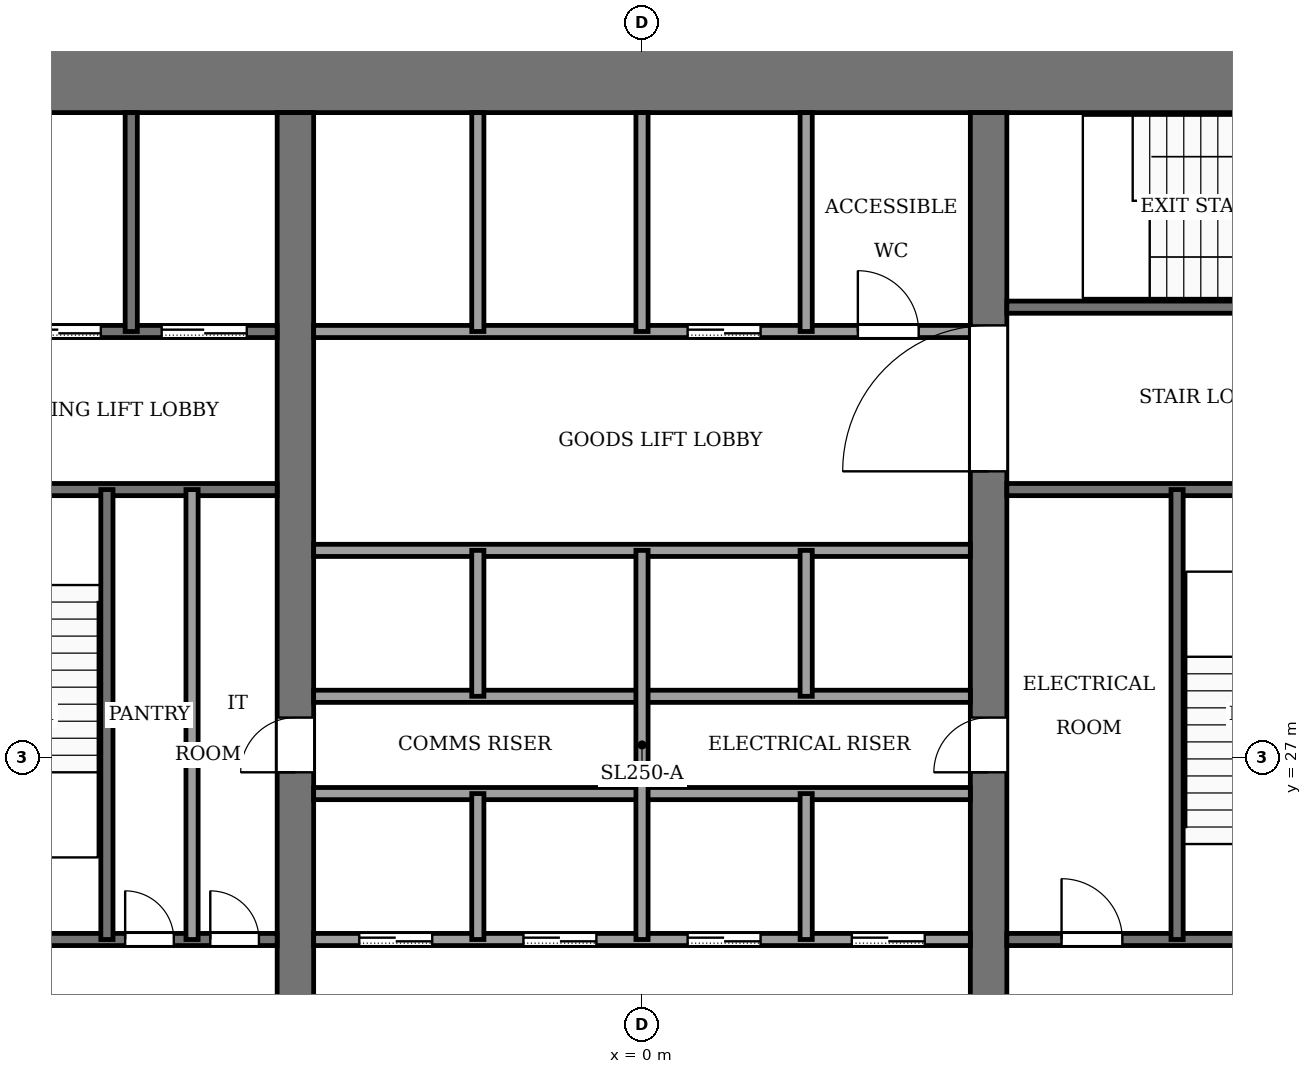
"""IFC4 building model, lengths in metres.
Left out: names, types, materials, properties, quantities, classifications, styles, units other than length and angle.
Written with IfcOpenShell. Run it as: python <this file> out.ifc"""

import sys

from ifc_helpers import new_model, si_unit, direction, frame, frame_2d, origin, place, context, subcontext, project, spatial, rectangle, extrude, element, fill, save


model = new_model("IFC4")
c1 = context("Model", 3, precision=1e-05, world=origin(), true_north=direction((0.0, 1.0)))
c2 = subcontext(c1, "Body", "Model", "MODEL_VIEW")
j1 = project(units=[si_unit("LENGTHUNIT", "METRE"), si_unit("PLANEANGLEUNIT", "RADIAN")], contexts=[c1])
p1 = place(None, origin())
s1 = spatial("IfcSite", under=j1, at=p1, CompositionType="ELEMENT")
p2 = place(p1, origin())
s2 = spatial("IfcBuilding", under=s1, at=p2, CompositionType="ELEMENT")
p3 = place(p2, frame((0.0, 0.0, 94.0)))
s3 = spatial("IfcBuildingStorey", under=s2, at=p3, CompositionType="ELEMENT", Elevation=94.0)
p4 = place(p3, frame((-13.8, 38.2, -0.13), z_axis=(0.0, 0.0, 1.0), x_axis=(1.0, 0.0, 0.0)))
e1 = element("IfcWall", 1, at=p4, inside=s3, PredefinedType="SHEAR", context=c2, shape_type="SweptSolid", body=[
    extrude(rectangle(XDim=27.6, YDim=1.2, at=frame_2d((13.8, 0.0))), origin(), (0.0, 0.0, 1.0), 4.0),
])
p5 = place(p3, frame((-5.7, 18.4, -0.13), z_axis=(0.0, 0.0, 1.0), x_axis=(0.0, 1.0, 0.0)))
e2 = element("IfcWall", 2, at=p5, inside=s3, PredefinedType="SHEAR", context=c2, shape_type="SweptSolid", body=[
    extrude(rectangle(XDim=19.2, YDim=0.6, at=frame_2d((9.6, 0.0))), origin(), (0.0, 0.0, 1.0), 4.0),
])
p6 = place(p5, frame((8.35, 0.0, 0.13)))
e3 = element("IfcOpeningElement", 3, at=p6, cuts=e2, PredefinedType="OPENING", context=c2, shape_type="SweptSolid", body=[
    extrude(rectangle(XDim=0.9, YDim=2.1, at=frame_2d((0.45, 1.05))), frame((0.0, 0.31, 0.0), z_axis=(0.0, -1.0, 0.0), x_axis=(1.0, 0.0, 0.0)), (0.0, 0.0, 1.0), 0.62),
])
p7 = place(p3, frame((5.7, 18.4, -0.13), z_axis=(0.0, 0.0, 1.0), x_axis=(0.0, 1.0, 0.0)))
e4 = element("IfcWall", 4, at=p7, inside=s3, PredefinedType="SHEAR", context=c2, shape_type="SweptSolid", body=[
    extrude(rectangle(XDim=19.2, YDim=0.6, at=frame_2d((9.6, 0.0))), origin(), (0.0, 0.0, 1.0), 4.0),
])
p8 = place(p7, frame((8.35, 0.0, 0.13)))
e5 = element("IfcOpeningElement", 5, at=p8, cuts=e4, PredefinedType="OPENING", context=c2, shape_type="SweptSolid", body=[
    extrude(rectangle(XDim=0.9, YDim=2.1, at=frame_2d((0.45, 1.05))), frame((0.0, 0.31, 0.0), z_axis=(0.0, -1.0, 0.0), x_axis=(1.0, 0.0, 0.0)), (0.0, 0.0, 1.0), 0.62),
])
p9 = place(p7, frame((13.3, 0.0, 0.13)))
e6 = element("IfcOpeningElement", 6, at=p9, cuts=e4, PredefinedType="OPENING", context=c2, shape_type="SweptSolid", body=[
    extrude(rectangle(XDim=2.4, YDim=2.4, at=frame_2d((1.2, 1.2))), frame((0.0, 0.31, 0.0), z_axis=(0.0, -1.0, 0.0), x_axis=(1.0, 0.0, 0.0)), (0.0, 0.0, 1.0), 0.62),
])
p10 = place(p3, frame((-12.6, 24.0, 0.0), z_axis=(0.0, 0.0, 1.0), x_axis=(1.0, 0.0, 0.0)))
e7 = element("IfcWall", 7, at=p10, inside=s3, PredefinedType="PARTITIONING", context=c2, shape_type="SweptSolid", body=[
    extrude(rectangle(XDim=6.6, YDim=0.2, at=frame_2d((3.3, 0.0))), origin(), (0.0, 0.0, 1.0), 3.87),
])
p11 = place(p10, frame((4.1, 0.0, 0.0)))
e8 = element("IfcOpeningElement", 8, at=p11, cuts=e7, PredefinedType="OPENING", context=c2, shape_type="SweptSolid", body=[
    extrude(rectangle(XDim=0.8, YDim=2.1, at=frame_2d((0.4, 1.05))), frame((0.0, 0.11, 0.0), z_axis=(0.0, -1.0, 0.0), x_axis=(1.0, 0.0, 0.0)), (0.0, 0.0, 1.0), 0.22),
])
p12 = place(p10, frame((5.5, 0.0, 0.0)))
e9 = element("IfcOpeningElement", 9, at=p12, cuts=e7, PredefinedType="OPENING", context=c2, shape_type="SweptSolid", body=[
    extrude(rectangle(XDim=0.8, YDim=2.1, at=frame_2d((0.4, 1.05))), frame((0.0, 0.11, 0.0), z_axis=(0.0, -1.0, 0.0), x_axis=(1.0, 0.0, 0.0)), (0.0, 0.0, 1.0), 0.22),
])
p13 = place(p3, frame((-5.4, 24.0, 0.0), z_axis=(0.0, 0.0, 1.0), x_axis=(1.0, 0.0, 0.0)))
e10 = element("IfcWall", 10, at=p13, inside=s3, PredefinedType="PARTITIONING", context=c2, shape_type="SweptSolid", body=[
    extrude(rectangle(XDim=10.8, YDim=0.2, at=frame_2d((5.4, 0.0))), origin(), (0.0, 0.0, 1.0), 3.87),
])
p14 = place(p13, frame((0.75, 0.0, 0.0)))
e11 = element("IfcOpeningElement", 11, at=p14, cuts=e10, PredefinedType="OPENING", context=c2, shape_type="SweptSolid", body=[
    extrude(rectangle(XDim=1.2, YDim=2.2, at=frame_2d((0.6, 1.1))), frame((0.0, 0.11, 0.0), z_axis=(0.0, -1.0, 0.0), x_axis=(1.0, 0.0, 0.0)), (0.0, 0.0, 1.0), 0.22),
])
p15 = place(p13, frame((3.45, 0.0, 0.0)))
e12 = element("IfcOpeningElement", 12, at=p15, cuts=e10, PredefinedType="OPENING", context=c2, shape_type="SweptSolid", body=[
    extrude(rectangle(XDim=1.2, YDim=2.2, at=frame_2d((0.6, 1.1))), frame((0.0, 0.11, 0.0), z_axis=(0.0, -1.0, 0.0), x_axis=(1.0, 0.0, 0.0)), (0.0, 0.0, 1.0), 0.22),
])
p16 = place(p13, frame((6.15, 0.0, 0.0)))
e13 = element("IfcOpeningElement", 13, at=p16, cuts=e10, PredefinedType="OPENING", context=c2, shape_type="SweptSolid", body=[
    extrude(rectangle(XDim=1.2, YDim=2.2, at=frame_2d((0.6, 1.1))), frame((0.0, 0.11, 0.0), z_axis=(0.0, -1.0, 0.0), x_axis=(1.0, 0.0, 0.0)), (0.0, 0.0, 1.0), 0.22),
])
p17 = place(p13, frame((8.85, 0.0, 0.0)))
e14 = element("IfcOpeningElement", 14, at=p17, cuts=e10, PredefinedType="OPENING", context=c2, shape_type="SweptSolid", body=[
    extrude(rectangle(XDim=1.2, YDim=2.2, at=frame_2d((0.6, 1.1))), frame((0.0, 0.11, 0.0), z_axis=(0.0, -1.0, 0.0), x_axis=(1.0, 0.0, 0.0)), (0.0, 0.0, 1.0), 0.22),
])
p18 = place(p3, frame((6.0, 24.0, 0.0), z_axis=(0.0, 0.0, 1.0), x_axis=(1.0, 0.0, 0.0)))
e15 = element("IfcWall", 15, at=p18, inside=s3, PredefinedType="PARTITIONING", context=c2, shape_type="SweptSolid", body=[
    extrude(rectangle(XDim=6.6, YDim=0.2, at=frame_2d((3.3, 0.0))), origin(), (0.0, 0.0, 1.0), 3.87),
])
p19 = place(p18, frame((0.9, 0.0, 0.0)))
e16 = element("IfcOpeningElement", 16, at=p19, cuts=e15, PredefinedType="OPENING", context=c2, shape_type="SweptSolid", body=[
    extrude(rectangle(XDim=1.0, YDim=2.1, at=frame_2d((0.5, 1.05))), frame((0.0, 0.11, 0.0), z_axis=(0.0, -1.0, 0.0), x_axis=(1.0, 0.0, 0.0)), (0.0, 0.0, 1.0), 0.22),
])
p20 = place(p18, frame((4.4, 0.0, 0.0)))
e17 = element("IfcOpeningElement", 17, at=p20, cuts=e15, PredefinedType="OPENING", context=c2, shape_type="SweptSolid", body=[
    extrude(rectangle(XDim=1.2, YDim=2.2, at=frame_2d((0.6, 1.1))), frame((0.0, 0.11, 0.0), z_axis=(0.0, -1.0, 0.0), x_axis=(1.0, 0.0, 0.0)), (0.0, 0.0, 1.0), 0.22),
])
for number, where, z_axis, x_axis in (
    (18, (-5.4, 26.4, 0.0), (0.0, 0.0, 1.0), (1.0, 0.0, 0.0)),
    (19, (-5.4, 28.0, 0.0), (0.0, 0.0, 1.0), (1.0, 0.0, 0.0)),
    (20, (-5.4, 30.4, 0.0), (0.0, 0.0, 1.0), (1.0, 0.0, 0.0)),
):
    element("IfcWall", number, at=place(p3, frame(where, z_axis=z_axis, x_axis=x_axis)), inside=s3, PredefinedType="PARTITIONING", context=c2, shape_type="SweptSolid", body=[
        extrude(rectangle(XDim=10.8, YDim=0.2, at=frame_2d((5.4, 0.0))), origin(), (0.0, 0.0, 1.0), 3.87),
    ])
p21 = place(p3, frame((-12.6, 31.4, 0.0), z_axis=(0.0, 0.0, 1.0), x_axis=(1.0, 0.0, 0.0)))
e21 = element("IfcWall", 21, at=p21, inside=s3, PredefinedType="PARTITIONING", context=c2, shape_type="SweptSolid", body=[
    extrude(rectangle(XDim=6.6, YDim=0.2, at=frame_2d((3.3, 0.0))), origin(), (0.0, 0.0, 1.0), 3.87),
])
p22 = place(p21, frame((1.0, 0.0, 0.0)))
e22 = element("IfcOpeningElement", 22, at=p22, cuts=e21, PredefinedType="OPENING", context=c2, shape_type="SweptSolid", body=[
    extrude(rectangle(XDim=1.2, YDim=2.2, at=frame_2d((0.6, 1.1))), frame((0.0, 0.11, 0.0), z_axis=(0.0, -1.0, 0.0), x_axis=(1.0, 0.0, 0.0)), (0.0, 0.0, 1.0), 0.22),
])
p23 = place(p3, frame((6.0, 31.4, 0.0), z_axis=(0.0, 0.0, 1.0), x_axis=(1.0, 0.0, 0.0)))
e23 = element("IfcWall", 23, at=p23, inside=s3, PredefinedType="PARTITIONING", context=c2, shape_type="SweptSolid", body=[
    extrude(rectangle(XDim=6.6, YDim=0.2, at=frame_2d((3.3, 0.0))), origin(), (0.0, 0.0, 1.0), 3.87),
])
p24 = place(p3, frame((-12.6, 34.0, 0.0), z_axis=(0.0, 0.0, 1.0), x_axis=(1.0, 0.0, 0.0)))
e24 = element("IfcWall", 24, at=p24, inside=s3, PredefinedType="PARTITIONING", context=c2, shape_type="SweptSolid", body=[
    extrude(rectangle(XDim=6.6, YDim=0.2, at=frame_2d((3.3, 0.0))), origin(), (0.0, 0.0, 1.0), 3.87),
])
p25 = place(p24, frame((4.7, 0.0, 0.0)))
e25 = element("IfcOpeningElement", 25, at=p25, cuts=e24, PredefinedType="OPENING", context=c2, shape_type="SweptSolid", body=[
    extrude(rectangle(XDim=1.4, YDim=2.2, at=frame_2d((0.7, 1.1))), frame((0.0, 0.11, 0.0), z_axis=(0.0, -1.0, 0.0), x_axis=(1.0, 0.0, 0.0)), (0.0, 0.0, 1.0), 0.22),
])
p26 = place(p24, frame((2.3, 0.0, 0.0)))
e26 = element("IfcOpeningElement", 26, at=p26, cuts=e24, PredefinedType="OPENING", context=c2, shape_type="SweptSolid", body=[
    extrude(rectangle(XDim=1.4, YDim=2.2, at=frame_2d((0.7, 1.1))), frame((0.0, 0.11, 0.0), z_axis=(0.0, -1.0, 0.0), x_axis=(1.0, 0.0, 0.0)), (0.0, 0.0, 1.0), 0.22),
])
p27 = place(p24, frame((0.45, 0.0, 0.0)))
e27 = element("IfcOpeningElement", 27, at=p27, cuts=e24, PredefinedType="OPENING", context=c2, shape_type="SweptSolid", body=[
    extrude(rectangle(XDim=0.9, YDim=2.1, at=frame_2d((0.45, 1.05))), frame((0.0, 0.11, 0.0), z_axis=(0.0, -1.0, 0.0), x_axis=(1.0, 0.0, 0.0)), (0.0, 0.0, 1.0), 0.22),
])
p28 = place(p3, frame((-5.4, 34.0, 0.0), z_axis=(0.0, 0.0, 1.0), x_axis=(1.0, 0.0, 0.0)))
e28 = element("IfcWall", 28, at=p28, inside=s3, PredefinedType="PARTITIONING", context=c2, shape_type="SweptSolid", body=[
    extrude(rectangle(XDim=10.8, YDim=0.2, at=frame_2d((5.4, 0.0))), origin(), (0.0, 0.0, 1.0), 3.87),
])
p29 = place(p28, frame((6.15, 0.0, 0.0)))
e29 = element("IfcOpeningElement", 29, at=p29, cuts=e28, PredefinedType="OPENING", context=c2, shape_type="SweptSolid", body=[
    extrude(rectangle(XDim=1.2, YDim=2.2, at=frame_2d((0.6, 1.1))), frame((0.0, 0.11, 0.0), z_axis=(0.0, -1.0, 0.0), x_axis=(1.0, 0.0, 0.0)), (0.0, 0.0, 1.0), 0.22),
])
p30 = place(p28, frame((8.95, 0.0, 0.0)))
e30 = element("IfcOpeningElement", 30, at=p30, cuts=e28, PredefinedType="OPENING", context=c2, shape_type="SweptSolid", body=[
    extrude(rectangle(XDim=1.0, YDim=2.1, at=frame_2d((0.5, 1.05))), frame((0.0, 0.11, 0.0), z_axis=(0.0, -1.0, 0.0), x_axis=(1.0, 0.0, 0.0)), (0.0, 0.0, 1.0), 0.22),
])
p31 = place(p3, frame((6.0, 34.4, 0.0), z_axis=(0.0, 0.0, 1.0), x_axis=(1.0, 0.0, 0.0)))
e31 = element("IfcWall", 31, at=p31, inside=s3, PredefinedType="PARTITIONING", context=c2, shape_type="SweptSolid", body=[
    extrude(rectangle(XDim=6.6, YDim=0.2, at=frame_2d((3.3, 0.0))), origin(), (0.0, 0.0, 1.0), 3.87),
])
p32 = place(p31, frame((4.8, 0.0, 0.0)))
e32 = element("IfcOpeningElement", 32, at=p32, cuts=e31, PredefinedType="OPENING", context=c2, shape_type="SweptSolid", body=[
    extrude(rectangle(XDim=1.2, YDim=2.2, at=frame_2d((0.6, 1.1))), frame((0.0, 0.11, 0.0), z_axis=(0.0, -1.0, 0.0), x_axis=(1.0, 0.0, 0.0)), (0.0, 0.0, 1.0), 0.22),
])
p33 = place(p3, frame((-8.8, 24.0, 0.0), z_axis=(0.0, 0.0, 1.0), x_axis=(0.0, 1.0, 0.0)))
e33 = element("IfcWall", 33, at=p33, inside=s3, PredefinedType="PARTITIONING", context=c2, shape_type="SweptSolid", body=[
    extrude(rectangle(XDim=7.4, YDim=0.2, at=frame_2d((3.7, 0.0))), origin(), (0.0, 0.0, 1.0), 3.87),
])
p34 = place(p3, frame((-8.4, 34.0, 0.0), z_axis=(0.0, 0.0, 1.0), x_axis=(0.0, 1.0, 0.0)))
e34 = element("IfcWall", 34, at=p34, inside=s3, PredefinedType="PARTITIONING", context=c2, shape_type="SweptSolid", body=[
    extrude(rectangle(XDim=3.6, YDim=0.2, at=frame_2d((1.8, 0.0))), origin(), (0.0, 0.0, 1.0), 3.87),
])
p35 = place(p3, frame((-7.4, 24.0, 0.0), z_axis=(0.0, 0.0, 1.0), x_axis=(0.0, 1.0, 0.0)))
e35 = element("IfcWall", 35, at=p35, inside=s3, PredefinedType="PARTITIONING", context=c2, shape_type="SweptSolid", body=[
    extrude(rectangle(XDim=7.4, YDim=0.2, at=frame_2d((3.7, 0.0))), origin(), (0.0, 0.0, 1.0), 3.87),
])
for number, where, z_axis, x_axis in (
    (36, (-2.7, 24.0, 0.0), (0.0, 0.0, 1.0), (0.0, 1.0, 0.0)),
    (37, (-2.7, 28.0, 0.0), (0.0, 0.0, 1.0), (0.0, 1.0, 0.0)),
):
    element("IfcWall", number, at=place(p3, frame(where, z_axis=z_axis, x_axis=x_axis)), inside=s3, PredefinedType="PARTITIONING", context=c2, shape_type="SweptSolid", body=[
        extrude(rectangle(XDim=2.4, YDim=0.2, at=frame_2d((1.2, 0.0))), origin(), (0.0, 0.0, 1.0), 3.87),
    ])
p36 = place(p3, frame((-2.7, 34.0, 0.0), z_axis=(0.0, 0.0, 1.0), x_axis=(0.0, 1.0, 0.0)))
e38 = element("IfcWall", 38, at=p36, inside=s3, PredefinedType="PARTITIONING", context=c2, shape_type="SweptSolid", body=[
    extrude(rectangle(XDim=3.6, YDim=0.2, at=frame_2d((1.8, 0.0))), origin(), (0.0, 0.0, 1.0), 3.87),
])
p37 = place(p3, frame((0.0, 24.0, 0.0), z_axis=(0.0, 0.0, 1.0), x_axis=(0.0, 1.0, 0.0)))
e39 = element("IfcWall", 39, at=p37, inside=s3, PredefinedType="PARTITIONING", context=c2, shape_type="SweptSolid", body=[
    extrude(rectangle(XDim=6.4, YDim=0.2, at=frame_2d((3.2, 0.0))), origin(), (0.0, 0.0, 1.0), 3.87),
])
p38 = place(p3, frame((0.0, 34.0, 0.0), z_axis=(0.0, 0.0, 1.0), x_axis=(0.0, 1.0, 0.0)))
e40 = element("IfcWall", 40, at=p38, inside=s3, PredefinedType="PARTITIONING", context=c2, shape_type="SweptSolid", body=[
    extrude(rectangle(XDim=3.6, YDim=0.2, at=frame_2d((1.8, 0.0))), origin(), (0.0, 0.0, 1.0), 3.87),
])
for number, where, z_axis, x_axis in (
    (41, (2.7, 24.0, 0.0), (0.0, 0.0, 1.0), (0.0, 1.0, 0.0)),
    (42, (2.7, 28.0, 0.0), (0.0, 0.0, 1.0), (0.0, 1.0, 0.0)),
):
    element("IfcWall", number, at=place(p3, frame(where, z_axis=z_axis, x_axis=x_axis)), inside=s3, PredefinedType="PARTITIONING", context=c2, shape_type="SweptSolid", body=[
        extrude(rectangle(XDim=2.4, YDim=0.2, at=frame_2d((1.2, 0.0))), origin(), (0.0, 0.0, 1.0), 3.87),
    ])
p39 = place(p3, frame((2.7, 34.0, 0.0), z_axis=(0.0, 0.0, 1.0), x_axis=(0.0, 1.0, 0.0)))
e43 = element("IfcWall", 43, at=p39, inside=s3, PredefinedType="PARTITIONING", context=c2, shape_type="SweptSolid", body=[
    extrude(rectangle(XDim=3.6, YDim=0.2, at=frame_2d((1.8, 0.0))), origin(), (0.0, 0.0, 1.0), 3.87),
])
p40 = place(p3, frame((8.8, 24.0, 0.0), z_axis=(0.0, 0.0, 1.0), x_axis=(0.0, 1.0, 0.0)))
e44 = element("IfcWall", 44, at=p40, inside=s3, PredefinedType="PARTITIONING", context=c2, shape_type="SweptSolid", body=[
    extrude(rectangle(XDim=7.4, YDim=0.2, at=frame_2d((3.7, 0.0))), origin(), (0.0, 0.0, 1.0), 3.87),
])
p41 = place(p14, origin())
e45 = element("IfcDoor", 45, at=p41, inside=s3, OperationType="SLIDING_TO_LEFT", PredefinedType="DOOR", context=c2, shape_type="SweptSolid", body=[
    extrude(rectangle(XDim=1.2, YDim=2.2, at=frame_2d((0.6, 1.1))), frame((0.0, 0.025, 0.0), z_axis=(0.0, -1.0, 0.0), x_axis=(1.0, 0.0, 0.0)), (0.0, 0.0, 1.0), 0.05),
])
fill(e11, e45)
p42 = place(p15, origin())
e46 = element("IfcDoor", 46, at=p42, inside=s3, OperationType="SLIDING_TO_LEFT", PredefinedType="DOOR", context=c2, shape_type="SweptSolid", body=[
    extrude(rectangle(XDim=1.2, YDim=2.2, at=frame_2d((0.6, 1.1))), frame((0.0, 0.025, 0.0), z_axis=(0.0, -1.0, 0.0), x_axis=(1.0, 0.0, 0.0)), (0.0, 0.0, 1.0), 0.05),
])
fill(e12, e46)
p43 = place(p16, origin())
e47 = element("IfcDoor", 47, at=p43, inside=s3, OperationType="SLIDING_TO_LEFT", PredefinedType="DOOR", context=c2, shape_type="SweptSolid", body=[
    extrude(rectangle(XDim=1.2, YDim=2.2, at=frame_2d((0.6, 1.1))), frame((0.0, 0.025, 0.0), z_axis=(0.0, -1.0, 0.0), x_axis=(1.0, 0.0, 0.0)), (0.0, 0.0, 1.0), 0.05),
])
fill(e13, e47)
p44 = place(p17, origin())
e48 = element("IfcDoor", 48, at=p44, inside=s3, OperationType="SLIDING_TO_LEFT", PredefinedType="DOOR", context=c2, shape_type="SweptSolid", body=[
    extrude(rectangle(XDim=1.2, YDim=2.2, at=frame_2d((0.6, 1.1))), frame((0.0, 0.025, 0.0), z_axis=(0.0, -1.0, 0.0), x_axis=(1.0, 0.0, 0.0)), (0.0, 0.0, 1.0), 0.05),
])
fill(e14, e48)
p45 = place(p29, origin())
e49 = element("IfcDoor", 49, at=p45, inside=s3, OperationType="SLIDING_TO_LEFT", PredefinedType="DOOR", context=c2, shape_type="SweptSolid", body=[
    extrude(rectangle(XDim=1.2, YDim=2.2, at=frame_2d((0.6, 1.1))), frame((0.0, 0.025, 0.0), z_axis=(0.0, -1.0, 0.0), x_axis=(1.0, 0.0, 0.0)), (0.0, 0.0, 1.0), 0.05),
])
fill(e29, e49)
p46 = place(p25, origin())
e50 = element("IfcDoor", 50, at=p46, inside=s3, OperationType="SLIDING_TO_LEFT", PredefinedType="DOOR", context=c2, shape_type="SweptSolid", body=[
    extrude(rectangle(XDim=1.4, YDim=2.2, at=frame_2d((0.7, 1.1))), frame((0.0, 0.025, 0.0), z_axis=(0.0, -1.0, 0.0), x_axis=(1.0, 0.0, 0.0)), (0.0, 0.0, 1.0), 0.05),
])
fill(e25, e50)
p47 = place(p26, origin())
e51 = element("IfcDoor", 51, at=p47, inside=s3, OperationType="SLIDING_TO_LEFT", PredefinedType="DOOR", context=c2, shape_type="SweptSolid", body=[
    extrude(rectangle(XDim=1.4, YDim=2.2, at=frame_2d((0.7, 1.1))), frame((0.0, 0.025, 0.0), z_axis=(0.0, -1.0, 0.0), x_axis=(1.0, 0.0, 0.0)), (0.0, 0.0, 1.0), 0.05),
])
fill(e26, e51)
p48 = place(p11, origin())
e52 = element("IfcDoor", 52, at=p48, inside=s3, OperationType="SINGLE_SWING_LEFT", PredefinedType="DOOR", context=c2, shape_type="SweptSolid", body=[
    extrude(rectangle(XDim=0.8, YDim=2.1, at=frame_2d((0.4, 1.05))), frame((0.0, 0.025, 0.0), z_axis=(0.0, -1.0, 0.0), x_axis=(1.0, 0.0, 0.0)), (0.0, 0.0, 1.0), 0.05),
])
fill(e8, e52)
p49 = place(p12, origin())
e53 = element("IfcDoor", 53, at=p49, inside=s3, OperationType="SINGLE_SWING_RIGHT", PredefinedType="DOOR", context=c2, shape_type="SweptSolid", body=[
    extrude(rectangle(XDim=0.8, YDim=2.1, at=frame_2d((0.4, 1.05))), frame((0.0, 0.025, 0.0), z_axis=(0.0, -1.0, 0.0), x_axis=(1.0, 0.0, 0.0)), (0.0, 0.0, 1.0), 0.05),
])
fill(e9, e53)
p50 = place(p19, origin())
e54 = element("IfcDoor", 54, at=p50, inside=s3, OperationType="SINGLE_SWING_RIGHT", PredefinedType="DOOR", context=c2, shape_type="SweptSolid", body=[
    extrude(rectangle(XDim=1.0, YDim=2.1, at=frame_2d((0.5, 1.05))), frame((0.0, 0.025, 0.0), z_axis=(0.0, -1.0, 0.0), x_axis=(1.0, 0.0, 0.0)), (0.0, 0.0, 1.0), 0.05),
])
fill(e16, e54)
p51 = place(p30, origin())
e55 = element("IfcDoor", 55, at=p51, inside=s3, OperationType="SINGLE_SWING_LEFT", PredefinedType="DOOR", context=c2, shape_type="SweptSolid", body=[
    extrude(rectangle(XDim=1.0, YDim=2.1, at=frame_2d((0.5, 1.05))), frame((0.0, 0.025, 0.0), z_axis=(0.0, -1.0, 0.0), x_axis=(1.0, 0.0, 0.0)), (0.0, 0.0, 1.0), 0.05),
])
fill(e30, e55)
p52 = place(p6, origin())
e56 = element("IfcDoor", 56, at=p52, inside=s3, OperationType="SINGLE_SWING_LEFT", PredefinedType="DOOR", context=c2, shape_type="SweptSolid", body=[
    extrude(rectangle(XDim=0.9, YDim=2.1, at=frame_2d((0.45, 1.05))), frame((0.0, 0.025, 0.0), z_axis=(0.0, -1.0, 0.0), x_axis=(1.0, 0.0, 0.0)), (0.0, 0.0, 1.0), 0.05),
])
fill(e3, e56)
p53 = place(p8, origin())
e57 = element("IfcDoor", 57, at=p53, inside=s3, OperationType="SINGLE_SWING_RIGHT", PredefinedType="DOOR", context=c2, shape_type="SweptSolid", body=[
    extrude(rectangle(XDim=0.9, YDim=2.1, at=frame_2d((0.45, 1.05))), frame((0.0, 0.025, 0.0), z_axis=(0.0, -1.0, 0.0), x_axis=(1.0, 0.0, 0.0)), (0.0, 0.0, 1.0), 0.05),
])
fill(e5, e57)
p54 = place(p9, origin())
e58 = element("IfcDoor", 58, at=p54, inside=s3, OperationType="DOUBLE_DOOR_SINGLE_SWING", PredefinedType="DOOR", context=c2, shape_type="SweptSolid", body=[
    extrude(rectangle(XDim=2.4, YDim=2.4, at=frame_2d((1.2, 1.2))), frame((0.0, 0.025, 0.0), z_axis=(0.0, -1.0, 0.0), x_axis=(1.0, 0.0, 0.0)), (0.0, 0.0, 1.0), 0.05),
])
fill(e6, e58)
save(model, sys.argv[1])
